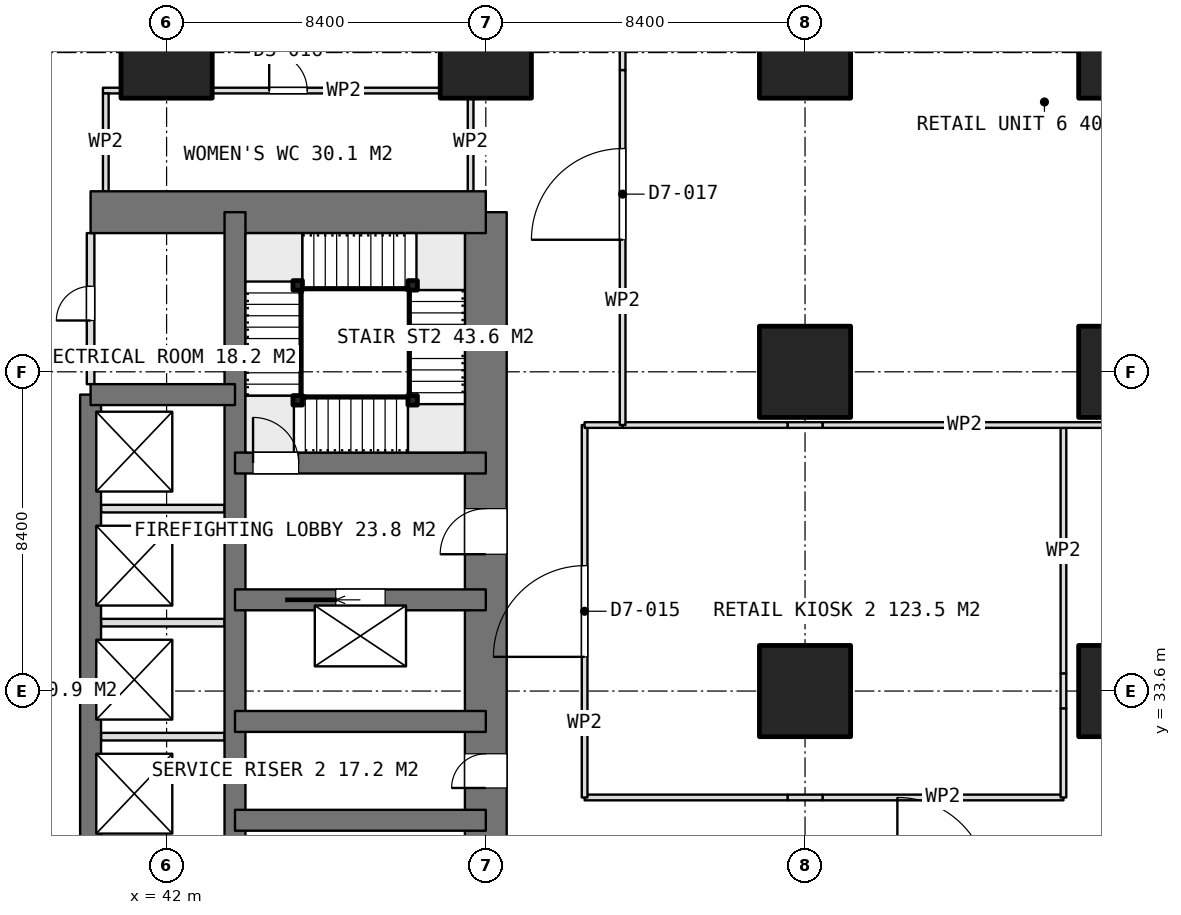
"""IFC4 building model, lengths in metres.
Left out: names, types, materials, properties, quantities, classifications, styles, units other than length and angle.
Written with IfcOpenShell. Run it as: python <this file> out.ifc"""

import sys

from ifc_helpers import new_model, si_unit, direction, frame, frame_2d, origin, origin_2d, place, context, subcontext, project, spatial, rectangle, extrude, element, fill, save


model = new_model("IFC4")
c1 = context("Model", 3, precision=1e-05, world=origin(), true_north=direction((0.0, 1.0)))
c2 = subcontext(c1, "Body", "Model", "MODEL_VIEW")
j1 = project(units=[si_unit("LENGTHUNIT", "METRE"), si_unit("PLANEANGLEUNIT", "RADIAN")], contexts=[c1])
p1 = place(None, origin())
s1 = spatial("IfcSite", under=j1, at=p1, CompositionType="ELEMENT")
p2 = place(p1, origin())
s2 = spatial("IfcBuilding", under=s1, at=p2, CompositionType="ELEMENT")
p3 = place(p2, frame((0.0, 0.0, 5.4)))
s3 = spatial("IfcBuildingStorey", under=s2, at=p3, CompositionType="ELEMENT", Elevation=5.4)
p4 = place(p3, frame((40.0, 46.2, 0.0), z_axis=(0.0, 0.0, 1.0), x_axis=(1.0, 0.0, 0.0)))
e1 = element("IfcWall", 1, at=p4, inside=s3, PredefinedType="SHEAR", context=c2, shape_type="SweptSolid", body=[
    extrude(rectangle(XDim=10.4, YDim=1.1, at=frame_2d((5.2, 0.0))), origin(), (0.0, 0.0, 1.0), 5.0),
])
p5 = place(p3, frame((50.4, 21.0, 0.0), z_axis=(0.0, 0.0, 1.0), x_axis=(0.0, 1.0, 0.0)))
e2 = element("IfcWall", 2, at=p5, inside=s3, PredefinedType="SHEAR", context=c2, shape_type="SweptSolid", body=[
    extrude(rectangle(XDim=25.2, YDim=1.1, at=frame_2d((12.6, 0.0))), origin(), (0.0, 0.0, 1.0), 5.0),
])
p6 = place(p5, frame((16.2, 0.0, 0.0)))
e3 = element("IfcOpeningElement", 3, at=p6, cuts=e2, PredefinedType="OPENING", context=c2, shape_type="SweptSolid", body=[
    extrude(rectangle(XDim=1.2, YDim=2.1, at=frame_2d((0.6, 1.05))), frame((0.0, 0.56, 0.0), z_axis=(0.0, -1.0, 0.0), x_axis=(1.0, 0.0, 0.0)), (0.0, 0.0, 1.0), 1.12),
])
p7 = place(p5, frame((10.05, 0.0, 0.0)))
e4 = element("IfcOpeningElement", 4, at=p7, cuts=e2, PredefinedType="OPENING", context=c2, shape_type="SweptSolid", body=[
    extrude(rectangle(XDim=0.9, YDim=2.1, at=frame_2d((0.45, 1.05))), frame((0.0, 0.56, 0.0), z_axis=(0.0, -1.0, 0.0), x_axis=(1.0, 0.0, 0.0)), (0.0, 0.0, 1.0), 1.12),
])
p8 = place(p5, frame((7.45, 0.0, 0.0)))
e5 = element("IfcOpeningElement", 5, at=p8, cuts=e2, PredefinedType="OPENING", context=c2, shape_type="SweptSolid", body=[
    extrude(rectangle(XDim=0.9, YDim=2.1, at=frame_2d((0.45, 1.05))), frame((0.0, 0.56, 0.0), z_axis=(0.0, -1.0, 0.0), x_axis=(1.0, 0.0, 0.0)), (0.0, 0.0, 1.0), 1.12),
])
p9 = place(p5, frame((0.75, 0.0, 0.0)))
e6 = element("IfcOpeningElement", 6, at=p9, cuts=e2, PredefinedType="OPENING", context=c2, shape_type="SweptSolid", body=[
    extrude(rectangle(XDim=1.2, YDim=2.1, at=frame_2d((0.6, 1.05))), frame((0.0, 0.56, 0.0), z_axis=(0.0, -1.0, 0.0), x_axis=(1.0, 0.0, 0.0)), (0.0, 0.0, 1.0), 1.12),
])
p10 = place(p3, frame((43.8, 21.0, 0.0), z_axis=(0.0, 0.0, 1.0), x_axis=(0.0, 1.0, 0.0)))
e7 = element("IfcWall", 7, at=p10, inside=s3, PredefinedType="SHEAR", context=c2, shape_type="SweptSolid", body=[
    extrude(rectangle(XDim=25.2, YDim=0.55, at=frame_2d((12.6, 0.0))), origin(), (0.0, 0.0, 1.0), 5.0),
])
p11 = place(p3, frame((40.0, 23.4, 0.0), z_axis=(0.0, 0.0, 1.0), x_axis=(0.0, 1.0, 0.0)))
e8 = element("IfcWall", 8, at=p11, inside=s3, PredefinedType="SHEAR", context=c2, shape_type="SweptSolid", body=[
    extrude(rectangle(XDim=18.0, YDim=0.55, at=frame_2d((9.0, 0.0))), origin(), (0.0, 0.0, 1.0), 5.0),
])
p12 = place(p3, frame((40.0, 41.4, 0.0), z_axis=(0.0, 0.0, 1.0), x_axis=(1.0, 0.0, 0.0)))
e9 = element("IfcWall", 9, at=p12, inside=s3, PredefinedType="SHEAR", context=c2, shape_type="SweptSolid", body=[
    extrude(rectangle(XDim=3.8, YDim=0.55, at=frame_2d((1.9, 0.0))), origin(), (0.0, 0.0, 1.0), 5.0),
])
for number, where, z_axis, x_axis in (
    (10, (43.8, 30.2, 0.0), (0.0, 0.0, 1.0), (1.0, 0.0, 0.0)),
    (11, (43.8, 32.8, 0.0), (0.0, 0.0, 1.0), (1.0, 0.0, 0.0)),
):
    element("IfcWall", number, at=place(p3, frame(where, z_axis=z_axis, x_axis=x_axis)), inside=s3, PredefinedType="SHEAR", context=c2, shape_type="SweptSolid", body=[
        extrude(rectangle(XDim=6.6, YDim=0.55, at=frame_2d((3.3, 0.0))), origin(), (0.0, 0.0, 1.0), 5.0),
    ])
p13 = place(p3, frame((43.8, 36.0, 0.0), z_axis=(0.0, 0.0, 1.0), x_axis=(1.0, 0.0, 0.0)))
e12 = element("IfcWall", 12, at=p13, inside=s3, PredefinedType="SHEAR", context=c2, shape_type="SweptSolid", body=[
    extrude(rectangle(XDim=6.6, YDim=0.55, at=frame_2d((3.3, 0.0))), origin(), (0.0, 0.0, 1.0), 5.0),
])
p14 = place(p13, frame((2.65, 0.0, 0.0)))
e13 = element("IfcOpeningElement", 13, at=p14, cuts=e12, PredefinedType="OPENING", context=c2, shape_type="SweptSolid", body=[
    extrude(rectangle(XDim=1.3, YDim=2.1, at=frame_2d((0.65, 1.05))), frame((0.0, 0.285, 0.0), z_axis=(0.0, -1.0, 0.0), x_axis=(1.0, 0.0, 0.0)), (0.0, 0.0, 1.0), 0.57),
])
p15 = place(p3, frame((43.8, 39.6, 0.0), z_axis=(0.0, 0.0, 1.0), x_axis=(1.0, 0.0, 0.0)))
e14 = element("IfcWall", 14, at=p15, inside=s3, PredefinedType="SHEAR", context=c2, shape_type="SweptSolid", body=[
    extrude(rectangle(XDim=6.6, YDim=0.55, at=frame_2d((3.3, 0.0))), origin(), (0.0, 0.0, 1.0), 5.0),
])
p16 = place(p15, frame((0.475, 0.0, 0.0)))
e15 = element("IfcOpeningElement", 15, at=p16, cuts=e14, PredefinedType="OPENING", context=c2, shape_type="SweptSolid", body=[
    extrude(rectangle(XDim=1.2, YDim=2.1, at=frame_2d((0.6, 1.05))), frame((0.0, 0.285, 0.0), z_axis=(0.0, -1.0, 0.0), x_axis=(1.0, 0.0, 0.0)), (0.0, 0.0, 1.0), 0.57),
])
for number, where, z_axis, x_axis in (
    (16, (42.0, 50.4, 0.0), (0.0, 0.0, 1.0), (1.0, 0.0, 0.0)),
    (17, (50.4, 50.4, 0.0), (0.0, 0.0, 1.0), (1.0, 0.0, 0.0)),
    (18, (58.8, 33.6, 0.0), (0.0, 0.0, 1.0), (1.0, 0.0, 0.0)),
    (19, (58.8, 42.0, 0.0), (0.0, 0.0, 1.0), (1.0, 0.0, 0.0)),
    (20, (58.8, 50.4, 0.0), (0.0, 0.0, 1.0), (1.0, 0.0, 0.0)),
    (21, (67.2, 33.6, 0.0), (0.0, 0.0, 1.0), (1.0, 0.0, 0.0)),
    (22, (67.2, 42.0, 0.0), (0.0, 0.0, 1.0), (1.0, 0.0, 0.0)),
    (23, (67.2, 50.4, 0.0), (0.0, 0.0, 1.0), (1.0, 0.0, 0.0)),
):
    element("IfcColumn", number, at=place(p3, frame(where, z_axis=z_axis, x_axis=x_axis)), inside=s3, PredefinedType="COLUMN", context=c2, shape_type="SweptSolid", body=[
        extrude(rectangle(XDim=2.4, YDim=2.4, at=origin_2d()), origin(), (0.0, 0.0, 1.0), 5.0),
    ])
for number, where, z_axis, x_axis in (
    (24, (40.275, 32.4, 0.0), (0.0, 0.0, 1.0), (1.0, 0.0, 0.0)),
    (25, (40.275, 35.4, 0.0), (0.0, 0.0, 1.0), (1.0, 0.0, 0.0)),
    (26, (40.275, 38.4, 0.0), (0.0, 0.0, 1.0), (1.0, 0.0, 0.0)),
):
    element("IfcWall", number, at=place(p3, frame(where, z_axis=z_axis, x_axis=x_axis)), inside=s3, PredefinedType="PARTITIONING", context=c2, shape_type="SweptSolid", body=[
        extrude(rectangle(XDim=3.25, YDim=0.2, at=frame_2d((1.625, 0.0))), origin(), (0.0, 0.0, 1.0), 4.7),
    ])
p17 = place(p3, frame((40.0, 41.675, 0.0), z_axis=(0.0, 0.0, 1.0), x_axis=(0.0, 1.0, 0.0)))
e27 = element("IfcWall", 27, at=p17, inside=s3, PredefinedType="PARTITIONING", context=c2, shape_type="SweptSolid", body=[
    extrude(rectangle(XDim=3.975, YDim=0.2, at=frame_2d((1.987, 0.0))), origin(), (0.0, 0.0, 1.0), 4.7),
])
p18 = place(p17, frame((1.675, 0.0, 0.0)))
e28 = element("IfcOpeningElement", 28, at=p18, cuts=e27, PredefinedType="OPENING", context=c2, shape_type="SweptSolid", body=[
    extrude(rectangle(XDim=0.9, YDim=2.1, at=frame_2d((0.45, 1.05))), frame((0.0, 0.11, 0.0), z_axis=(0.0, -1.0, 0.0), x_axis=(1.0, 0.0, 0.0)), (0.0, 0.0, 1.0), 0.22),
])
p19 = place(p3, frame((40.325, 49.4, 0.0), z_axis=(0.0, 0.0, 1.0), x_axis=(1.0, 0.0, 0.0)))
e29 = element("IfcWall", 29, at=p19, inside=s3, PredefinedType="PARTITIONING", context=c2, shape_type="SweptSolid", body=[
    extrude(rectangle(XDim=9.75, YDim=0.15, at=frame_2d((4.875, 0.0))), origin(), (0.0, 0.0, 1.0), 4.7),
])
p20 = place(p19, frame((4.375, 0.0, 0.0)))
e30 = element("IfcOpeningElement", 30, at=p20, cuts=e29, PredefinedType="OPENING", context=c2, shape_type="SweptSolid", body=[
    extrude(rectangle(XDim=1.0, YDim=2.1, at=frame_2d((0.5, 1.05))), frame((0.0, 0.085, 0.0), z_axis=(0.0, -1.0, 0.0), x_axis=(1.0, 0.0, 0.0)), (0.0, 0.0, 1.0), 0.17),
])
for number, where, z_axis, x_axis in (
    (31, (40.4, 46.75, 0.0), (0.0, 0.0, 1.0), (0.0, 1.0, 0.0)),
    (32, (50.0, 46.75, 0.0), (0.0, 0.0, 1.0), (0.0, 1.0, 0.0)),
):
    element("IfcWall", number, at=place(p3, frame(where, z_axis=z_axis, x_axis=x_axis)), inside=s3, PredefinedType="PARTITIONING", context=c2, shape_type="SweptSolid", body=[
        extrude(rectangle(XDim=2.575, YDim=0.15, at=frame_2d((1.288, 0.0))), origin(), (0.0, 0.0, 1.0), 4.7),
    ])
p21 = place(p3, frame((66.74, 40.6, 0.0), z_axis=(0.0, 0.0, 1.0), x_axis=(-1.0, 0.0, 0.0)))
e33 = element("IfcWall", 33, at=p21, inside=s3, PredefinedType="PARTITIONING", context=c2, shape_type="SweptSolid", body=[
    extrude(rectangle(XDim=7.48, YDim=0.15, at=frame_2d((3.74, 0.0))), origin(), (0.0, 0.0, 1.0), 4.7),
])
p22 = place(p3, frame((59.26, 40.6, 0.0), z_axis=(0.0, 0.0, 1.0), x_axis=(-1.0, 0.0, 0.0)))
e34 = element("IfcWall", 34, at=p22, inside=s3, PredefinedType="PARTITIONING", context=c2, shape_type="SweptSolid", body=[
    extrude(rectangle(XDim=0.92, YDim=0.15, at=frame_2d((0.46, 0.0))), origin(), (0.0, 0.0, 1.0), 2.9),
])
p23 = place(p3, frame((58.34, 40.6, 0.0), z_axis=(0.0, 0.0, 1.0), x_axis=(-1.0, 0.0, 0.0)))
e35 = element("IfcWall", 35, at=p23, inside=s3, PredefinedType="PARTITIONING", context=c2, shape_type="SweptSolid", body=[
    extrude(rectangle(XDim=4.34, YDim=0.15, at=frame_2d((2.17, 0.0))), origin(), (0.0, 0.0, 1.0), 4.7),
])
p24 = place(p3, frame((54.0, 40.6, 0.0), z_axis=(0.0, 0.0, 1.0), x_axis=(0.0, 1.0, 0.0)))
e36 = element("IfcWall", 36, at=p24, inside=s3, PredefinedType="PARTITIONING", context=c2, shape_type="SweptSolid", body=[
    extrude(rectangle(XDim=9.34, YDim=0.15, at=frame_2d((4.67, 0.0))), origin(), (0.0, 0.0, 1.0), 4.7),
])
p25 = place(p24, frame((4.875, 0.0, 0.0)))
e37 = element("IfcOpeningElement", 37, at=p25, cuts=e36, PredefinedType="OPENING", context=c2, shape_type="SweptSolid", body=[
    extrude(rectangle(XDim=2.4, YDim=2.4, at=frame_2d((1.2, 1.2))), frame((0.0, 0.085, 0.0), z_axis=(0.0, -1.0, 0.0), x_axis=(1.0, 0.0, 0.0)), (0.0, 0.0, 1.0), 0.17),
])
p26 = place(p3, frame((54.0, 49.94, 0.0), z_axis=(0.0, 0.0, 1.0), x_axis=(0.0, 1.0, 0.0)))
e38 = element("IfcWall", 38, at=p26, inside=s3, PredefinedType="PARTITIONING", context=c2, shape_type="SweptSolid", body=[
    extrude(rectangle(XDim=0.92, YDim=0.15, at=frame_2d((0.46, 0.0))), origin(), (0.0, 0.0, 1.0), 2.9),
])
p27 = place(p3, frame((65.6, 30.8, 0.0), z_axis=(0.0, 0.0, 1.0), x_axis=(-1.0, 0.0, 0.0)))
e39 = element("IfcWall", 39, at=p27, inside=s3, PredefinedType="PARTITIONING", context=c2, shape_type="SweptSolid", body=[
    extrude(rectangle(XDim=6.34, YDim=0.15, at=frame_2d((3.17, 0.0))), origin(), (0.0, 0.0, 1.0), 4.7),
])
p28 = place(p3, frame((59.26, 30.8, 0.0), z_axis=(0.0, 0.0, 1.0), x_axis=(-1.0, 0.0, 0.0)))
e40 = element("IfcWall", 40, at=p28, inside=s3, PredefinedType="PARTITIONING", context=c2, shape_type="SweptSolid", body=[
    extrude(rectangle(XDim=0.92, YDim=0.15, at=frame_2d((0.46, 0.0))), origin(), (0.0, 0.0, 1.0), 2.9),
])
p29 = place(p3, frame((58.34, 30.8, 0.0), z_axis=(0.0, 0.0, 1.0), x_axis=(-1.0, 0.0, 0.0)))
e41 = element("IfcWall", 41, at=p29, inside=s3, PredefinedType="PARTITIONING", context=c2, shape_type="SweptSolid", body=[
    extrude(rectangle(XDim=5.34, YDim=0.15, at=frame_2d((2.67, 0.0))), origin(), (0.0, 0.0, 1.0), 4.7),
])
p30 = place(p3, frame((53.0, 30.8, 0.0), z_axis=(0.0, 0.0, 1.0), x_axis=(0.0, 1.0, 0.0)))
e42 = element("IfcWall", 42, at=p30, inside=s3, PredefinedType="PARTITIONING", context=c2, shape_type="SweptSolid", body=[
    extrude(rectangle(XDim=9.8, YDim=0.15, at=frame_2d((4.9, 0.0))), origin(), (0.0, 0.0, 1.0), 4.7),
])
p31 = place(p30, frame((3.7, 0.0, 0.0)))
e43 = element("IfcOpeningElement", 43, at=p31, cuts=e42, PredefinedType="OPENING", context=c2, shape_type="SweptSolid", body=[
    extrude(rectangle(XDim=2.4, YDim=2.4, at=frame_2d((1.2, 1.2))), frame((0.0, 0.085, 0.0), z_axis=(0.0, -1.0, 0.0), x_axis=(1.0, 0.0, 0.0)), (0.0, 0.0, 1.0), 0.17),
])
p32 = place(p3, frame((53.0, 40.6, 0.0), z_axis=(0.0, 0.0, 1.0), x_axis=(1.0, 0.0, 0.0)))
e44 = element("IfcWall", 44, at=p32, inside=s3, PredefinedType="PARTITIONING", context=c2, shape_type="SweptSolid", body=[
    extrude(rectangle(XDim=1.0, YDim=0.15, at=frame_2d((0.5, 0.0))), origin(), (0.0, 0.0, 1.0), 4.7),
])
p33 = place(p3, frame((65.6, 40.525, 0.0), z_axis=(0.0, 0.0, 1.0), x_axis=(0.0, -1.0, 0.0)))
e45 = element("IfcWall", 45, at=p33, inside=s3, PredefinedType="PARTITIONING", context=c2, shape_type="SweptSolid", body=[
    extrude(rectangle(XDim=6.465, YDim=0.15, at=frame_2d((3.232, 0.0))), origin(), (0.0, 0.0, 1.0), 4.7),
])
p34 = place(p3, frame((65.6, 34.06, 0.0), z_axis=(0.0, 0.0, 1.0), x_axis=(0.0, -1.0, 0.0)))
e46 = element("IfcWall", 46, at=p34, inside=s3, PredefinedType="PARTITIONING", context=c2, shape_type="SweptSolid", body=[
    extrude(rectangle(XDim=0.92, YDim=0.15, at=frame_2d((0.46, 0.0))), origin(), (0.0, 0.0, 1.0), 2.9),
])
p35 = place(p3, frame((65.6, 33.14, 0.0), z_axis=(0.0, 0.0, 1.0), x_axis=(0.0, -1.0, 0.0)))
e47 = element("IfcWall", 47, at=p35, inside=s3, PredefinedType="PARTITIONING", context=c2, shape_type="SweptSolid", body=[
    extrude(rectangle(XDim=2.34, YDim=0.15, at=frame_2d((1.17, 0.0))), origin(), (0.0, 0.0, 1.0), 4.7),
])
for number, where, z_axis, x_axis in (
    (48, (45.45, 41.25, 0.0), (0.0, 0.0, 1.0), (1.0, 0.0, 0.0)),
    (49, (45.45, 44.275, 0.0), (0.0, 0.0, 1.0), (1.0, 0.0, 0.0)),
    (50, (48.475, 44.275, 0.0), (0.0, 0.0, 1.0), (1.0, 0.0, 0.0)),
    (51, (48.475, 41.25, 0.0), (0.0, 0.0, 1.0), (1.0, 0.0, 0.0)),
):
    element("IfcColumn", number, at=place(p3, frame(where, z_axis=z_axis, x_axis=x_axis)), inside=s3, PredefinedType="COLUMN", context=c2, shape_type="SweptSolid", body=[
        extrude(rectangle(XDim=0.25, YDim=0.25, at=origin_2d()), origin(), (0.0, 0.0, 1.0), 5.0),
    ])
p36 = place(p6, origin())
e52 = element("IfcDoor", 52, at=p36, inside=s3, OperationType="SINGLE_SWING_LEFT", PredefinedType="DOOR", context=c2, shape_type="SweptSolid", body=[
    extrude(rectangle(XDim=1.2, YDim=2.1, at=frame_2d((0.6, 1.05))), frame((0.0, 0.025, 0.0), z_axis=(0.0, -1.0, 0.0), x_axis=(1.0, 0.0, 0.0)), (0.0, 0.0, 1.0), 0.05),
])
fill(e3, e52)
p37 = place(p7, origin())
e53 = element("IfcDoor", 53, at=p37, inside=s3, OperationType="SINGLE_SWING_LEFT", PredefinedType="DOOR", context=c2, shape_type="SweptSolid", body=[
    extrude(rectangle(XDim=0.9, YDim=2.1, at=frame_2d((0.45, 1.05))), frame((0.0, 0.025, 0.0), z_axis=(0.0, -1.0, 0.0), x_axis=(1.0, 0.0, 0.0)), (0.0, 0.0, 1.0), 0.05),
])
fill(e4, e53)
p38 = place(p18, origin())
e54 = element("IfcDoor", 54, at=p38, inside=s3, OperationType="SINGLE_SWING_LEFT", PredefinedType="DOOR", context=c2, shape_type="SweptSolid", body=[
    extrude(rectangle(XDim=0.9, YDim=2.1, at=frame_2d((0.45, 1.05))), frame((0.0, 0.025, 0.0), z_axis=(0.0, -1.0, 0.0), x_axis=(1.0, 0.0, 0.0)), (0.0, 0.0, 1.0), 0.05),
])
fill(e28, e54)
p39 = place(p14, origin())
e55 = element("IfcDoor", 55, at=p39, inside=s3, OperationType="SLIDING_TO_LEFT", PredefinedType="USERDEFINED", context=c2, shape_type="SweptSolid", body=[
    extrude(rectangle(XDim=1.3, YDim=2.1, at=frame_2d((0.65, 1.05))), frame((0.0, 0.025, 0.0), z_axis=(0.0, -1.0, 0.0), x_axis=(1.0, 0.0, 0.0)), (0.0, 0.0, 1.0), 0.05),
])
fill(e13, e55)
p40 = place(p20, origin())
e56 = element("IfcDoor", 56, at=p40, inside=s3, OperationType="SINGLE_SWING_LEFT", PredefinedType="DOOR", context=c2, shape_type="SweptSolid", body=[
    extrude(rectangle(XDim=1.0, YDim=2.1, at=frame_2d((0.5, 1.05))), frame((0.0, 0.025, 0.0), z_axis=(0.0, -1.0, 0.0), x_axis=(1.0, 0.0, 0.0)), (0.0, 0.0, 1.0), 0.05),
])
fill(e30, e56)
p41 = place(p25, origin())
e57 = element("IfcDoor", 57, at=p41, inside=s3, OperationType="DOUBLE_DOOR_SINGLE_SWING", PredefinedType="DOOR", context=c2, shape_type="SweptSolid", body=[
    extrude(rectangle(XDim=2.4, YDim=2.4, at=frame_2d((1.2, 1.2))), frame((0.0, 0.025, 0.0), z_axis=(0.0, -1.0, 0.0), x_axis=(1.0, 0.0, 0.0)), (0.0, 0.0, 1.0), 0.05),
])
fill(e37, e57)
p42 = place(p31, origin())
e58 = element("IfcDoor", 58, at=p42, inside=s3, OperationType="DOUBLE_DOOR_SINGLE_SWING", PredefinedType="DOOR", context=c2, shape_type="SweptSolid", body=[
    extrude(rectangle(XDim=2.4, YDim=2.4, at=frame_2d((1.2, 1.2))), frame((0.0, 0.025, 0.0), z_axis=(0.0, -1.0, 0.0), x_axis=(1.0, 0.0, 0.0)), (0.0, 0.0, 1.0), 0.05),
])
fill(e43, e58)
p43 = place(p16, origin())
e59 = element("IfcDoor", 59, at=p43, inside=s3, OperationType="SINGLE_SWING_RIGHT", PredefinedType="DOOR", context=c2, shape_type="SweptSolid", body=[
    extrude(rectangle(XDim=1.2, YDim=2.1, at=frame_2d((0.6, 1.05))), frame((0.0, 0.025, 0.0), z_axis=(0.0, -1.0, 0.0), x_axis=(1.0, 0.0, 0.0)), (0.0, 0.0, 1.0), 0.05),
])
fill(e15, e59)
save(model, sys.argv[1])
